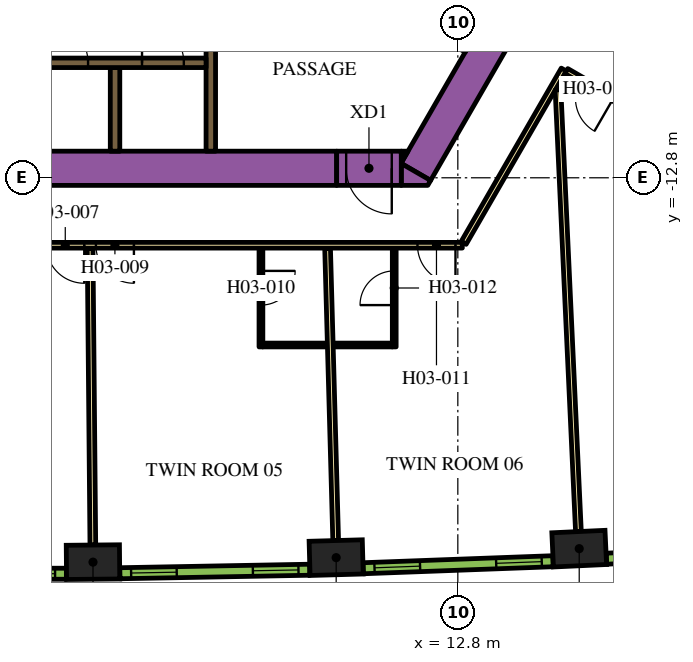
"""IFC4 building model, lengths in metres.
Left out: names, types, materials, properties, quantities, classifications, styles, units other than length and angle.
Written with IfcOpenShell. Run it as: python <this file> out.ifc"""

import sys

from ifc_helpers import new_model, si_unit, direction, frame, frame_2d, origin, origin_2d, place, context, subcontext, project, spatial, polyline, rectangle, outline, extrude, element, fill, save


model = new_model("IFC4")
c1 = context("Model", 3, precision=1e-05, world=origin(), true_north=direction((0.0, 1.0)))
c2 = subcontext(c1, "Body", "Model", "MODEL_VIEW")
j1 = project(units=[si_unit("LENGTHUNIT", "METRE"), si_unit("PLANEANGLEUNIT", "RADIAN")], contexts=[c1])
p1 = place(None, origin())
s1 = spatial("IfcSite", under=j1, at=p1, CompositionType="ELEMENT")
p2 = place(p1, origin())
s2 = spatial("IfcBuilding", under=s1, at=p2, CompositionType="ELEMENT")
p3 = place(p2, frame((0.0, 0.0, 58.8)))
s3 = spatial("IfcBuildingStorey", under=s2, at=p3, CompositionType="ELEMENT", Elevation=58.8)
for number, where, z_axis, x_axis in (
    (1, (3.2, -22.913, 0.0), (0.0, 0.0, 1.0), (1.0, 0.009, 0.0)),
    (2, (9.599, -22.795, 0.0), (0.0, 0.0, 1.0), (1.0, 0.028, 0.0)),
    (3, (15.994, -22.558, 0.0), (0.0, 0.0, 1.0), (0.999, 0.046, 0.0)),
):
    element("IfcColumn", number, at=place(p3, frame(where, z_axis=z_axis, x_axis=x_axis)), inside=s3, PredefinedType="COLUMN", context=c2, shape_type="SweptSolid", body=[
        extrude(rectangle(XDim=1.4, YDim=0.9, at=origin_2d()), origin(), (0.0, 0.0, 1.0), 3.9),
    ])
p4 = place(p3, frame((11.695, -12.644, 0.0), z_axis=(0.0, 0.0, 1.0), x_axis=(0.500010229568, 0.86601949766, 0.0)))
e4 = element("IfcWall", 4, at=p4, inside=s3, PredefinedType="SOLIDWALL", context=c2, shape_type="SweptSolid", body=[
    extrude(rectangle(XDim=9.326, YDim=0.9, at=frame_2d((4.663, 0.0))), origin(), (0.0, 0.0, 1.0), 3.9),
])
p5 = place(p3, origin())
e5 = element("IfcWall", 5, at=p5, inside=s3, PredefinedType="SOLIDWALL", context=c2, shape_type="SweptSolid", body=[
    extrude(outline(polyline([(12.009, -13.0), (11.312, -13.0), (11.312, -12.425), (12.083, -12.871), (12.009, -13.0)])), origin(), (0.0, 0.0, 1.0), 3.9),
])
e6 = element("IfcWall", 6, at=p5, inside=s3, PredefinedType="SOLIDWALL", context=c2, shape_type="SweptSolid", body=[
    extrude(outline(polyline([(11.489, -12.1), (11.312, -12.407), (11.312, -12.1), (11.489, -12.1)])), origin(), (0.0, 0.0, 1.0), 3.9),
])
p6 = place(p3, frame((-12.019, -12.55, 0.0), z_axis=(0.0, 0.0, 1.0), x_axis=(1.0, 0.0, 0.0)))
e7 = element("IfcWall", 7, at=p6, inside=s3, PredefinedType="SOLIDWALL", context=c2, shape_type="SweptSolid", body=[
    extrude(rectangle(XDim=21.63, YDim=0.9, at=frame_2d((10.815, 0.0))), origin(), (0.0, 0.0, 1.0), 3.9),
])
p7 = place(p3, frame((6.3, -8.67, 0.0), z_axis=(0.0, 0.0, 1.0), x_axis=(0.0, -1.0, 0.0)))
e8 = element("IfcWall", 8, at=p7, inside=s3, PredefinedType="SOLIDWALL", context=c2, shape_type="SweptSolid", body=[
    extrude(rectangle(XDim=3.43, YDim=0.25, at=frame_2d((1.715, 0.0))), origin(), (0.0, 0.0, 1.0), 3.9),
])
p8 = place(p3, frame((3.78, -12.1, 0.0), z_axis=(0.0, 0.0, 1.0), x_axis=(0.0, 1.0, 0.0)))
e9 = element("IfcWall", 9, at=p8, inside=s3, PredefinedType="SOLIDWALL", context=c2, shape_type="SweptSolid", body=[
    extrude(rectangle(XDim=2.2, YDim=0.25, at=frame_2d((1.1, 0.0))), origin(), (0.0, 0.0, 1.0), 3.9),
])
p9 = place(p3, frame((-6.175, -9.775, 0.0), z_axis=(0.0, 0.0, 1.0), x_axis=(1.0, 0.0, 0.0)))
e10 = element("IfcWall", 10, at=p9, inside=s3, PredefinedType="SOLIDWALL", context=c2, shape_type="SweptSolid", body=[
    extrude(rectangle(XDim=12.35, YDim=0.25, at=frame_2d((6.175, 0.0))), origin(), (0.0, 0.0, 1.0), 3.9),
])
p10 = place(p9, frame((0.585, 0.0, 0.0)))
e11 = element("IfcOpeningElement", 11, at=p10, cuts=e10, PredefinedType="OPENING", context=c2, shape_type="SweptSolid", body=[
    extrude(rectangle(XDim=1.1, YDim=2.1, at=frame_2d((0.55, 1.05))), frame((0.0, 0.135, 0.0), z_axis=(0.0, -1.0, 0.0), x_axis=(1.0, 0.0, 0.0)), (0.0, 0.0, 1.0), 0.27),
])
p11 = place(p9, frame((3.105, 0.0, 0.0)))
e12 = element("IfcOpeningElement", 12, at=p11, cuts=e10, PredefinedType="OPENING", context=c2, shape_type="SweptSolid", body=[
    extrude(rectangle(XDim=1.1, YDim=2.1, at=frame_2d((0.55, 1.05))), frame((0.0, 0.135, 0.0), z_axis=(0.0, -1.0, 0.0), x_axis=(1.0, 0.0, 0.0)), (0.0, 0.0, 1.0), 0.27),
])
p12 = place(p9, frame((5.625, 0.0, 0.0)))
e13 = element("IfcOpeningElement", 13, at=p12, cuts=e10, PredefinedType="OPENING", context=c2, shape_type="SweptSolid", body=[
    extrude(rectangle(XDim=1.1, YDim=2.1, at=frame_2d((0.55, 1.05))), frame((0.0, 0.135, 0.0), z_axis=(0.0, -1.0, 0.0), x_axis=(1.0, 0.0, 0.0)), (0.0, 0.0, 1.0), 0.27),
])
p13 = place(p9, frame((8.145, 0.0, 0.0)))
e14 = element("IfcOpeningElement", 14, at=p13, cuts=e10, PredefinedType="OPENING", context=c2, shape_type="SweptSolid", body=[
    extrude(rectangle(XDim=1.1, YDim=2.1, at=frame_2d((0.55, 1.05))), frame((0.0, 0.135, 0.0), z_axis=(0.0, -1.0, 0.0), x_axis=(1.0, 0.0, 0.0)), (0.0, 0.0, 1.0), 0.27),
])
p14 = place(p9, frame((10.665, 0.0, 0.0)))
e15 = element("IfcOpeningElement", 15, at=p14, cuts=e10, PredefinedType="OPENING", context=c2, shape_type="SweptSolid", body=[
    extrude(rectangle(XDim=1.1, YDim=2.1, at=frame_2d((0.55, 1.05))), frame((0.0, 0.135, 0.0), z_axis=(0.0, -1.0, 0.0), x_axis=(1.0, 0.0, 0.0)), (0.0, 0.0, 1.0), 0.27),
])
p15 = place(p3, frame((11.312, -12.55, 0.0), z_axis=(0.0, 0.0, 1.0), x_axis=(-1.0, 0.0, 0.0)))
e16 = element("IfcWall", 16, at=p15, inside=s3, PredefinedType="SOLIDWALL", context=c2, shape_type="SweptSolid", body=[
    extrude(rectangle(XDim=1.7, YDim=0.9, at=frame_2d((0.85, 0.0))), origin(), (0.0, 0.0, 1.0), 3.9),
])
p16 = place(p15, frame((0.25, 0.0, 0.0)))
e17 = element("IfcOpeningElement", 17, at=p16, cuts=e16, PredefinedType="OPENING", context=c2, shape_type="SweptSolid", body=[
    extrude(rectangle(XDim=1.2, YDim=2.1, at=frame_2d((0.6, 1.05))), frame((0.0, 0.46, 0.0), z_axis=(0.0, -1.0, 0.0), x_axis=(1.0, 0.0, 0.0)), (0.0, 0.0, 1.0), 0.92),
])
p17 = place(p3, frame((16.412, -8.523, 0.0), z_axis=(0.0, 0.0, 1.0), x_axis=(0.866022197818, -0.500005552856, 0.0)))
e18 = element("IfcWall", 18, at=p17, inside=s3, PredefinedType="PARTITIONING", context=c2, shape_type="SweptSolid", body=[
    extrude(rectangle(XDim=16.224, YDim=0.15, at=frame_2d((8.112, 0.0))), origin(), (0.0, 0.0, 1.0), 2.75),
])
p18 = place(p17, frame((7.949, 0.0, 0.0)))
e19 = element("IfcOpeningElement", 19, at=p18, cuts=e18, PredefinedType="OPENING", context=c2, shape_type="SweptSolid", body=[
    extrude(rectangle(XDim=1.0, YDim=2.1, at=frame_2d((0.5, 1.05))), frame((0.0, 0.085, 0.0), z_axis=(0.0, -1.0, 0.0), x_axis=(1.0, 0.0, 0.0)), (0.0, 0.0, 1.0), 0.17),
])
p19 = place(p17, frame((0.526, 0.0, 0.0)))
e20 = element("IfcOpeningElement", 20, at=p19, cuts=e18, PredefinedType="OPENING", context=c2, shape_type="SweptSolid", body=[
    extrude(rectangle(XDim=1.0, YDim=2.1, at=frame_2d((0.5, 1.05))), frame((0.0, 0.085, 0.0), z_axis=(0.0, -1.0, 0.0), x_axis=(1.0, 0.0, 0.0)), (0.0, 0.0, 1.0), 0.17),
])
p20 = place(p3, frame((12.918, -14.575, 0.0), z_axis=(0.0, 0.0, 1.0), x_axis=(-1.0, 0.0, 0.0)))
e21 = element("IfcWall", 21, at=p20, inside=s3, PredefinedType="PARTITIONING", context=c2, shape_type="SweptSolid", body=[
    extrude(rectangle(XDim=25.766, YDim=0.15, at=frame_2d((12.883, 0.0))), origin(), (0.0, 0.0, 1.0), 2.75),
])
p21 = place(p20, frame((24.586, 0.0, 0.0)))
e22 = element("IfcOpeningElement", 22, at=p21, cuts=e21, PredefinedType="OPENING", context=c2, shape_type="SweptSolid", body=[
    extrude(rectangle(XDim=1.0, YDim=2.1, at=frame_2d((0.5, 1.05))), frame((0.0, 0.085, 0.0), z_axis=(0.0, -1.0, 0.0), x_axis=(1.0, 0.0, 0.0)), (0.0, 0.0, 1.0), 0.17),
])
p22 = place(p20, frame((9.948, 0.0, 0.0)))
e23 = element("IfcOpeningElement", 23, at=p22, cuts=e21, PredefinedType="OPENING", context=c2, shape_type="SweptSolid", body=[
    extrude(rectangle(XDim=1.0, YDim=2.1, at=frame_2d((0.5, 1.05))), frame((0.0, 0.085, 0.0), z_axis=(0.0, -1.0, 0.0), x_axis=(1.0, 0.0, 0.0)), (0.0, 0.0, 1.0), 0.17),
])
p23 = place(p20, frame((8.642, 0.0, 0.0)))
e24 = element("IfcOpeningElement", 24, at=p23, cuts=e21, PredefinedType="OPENING", context=c2, shape_type="SweptSolid", body=[
    extrude(rectangle(XDim=1.0, YDim=2.1, at=frame_2d((0.5, 1.05))), frame((0.0, 0.085, 0.0), z_axis=(0.0, -1.0, 0.0), x_axis=(1.0, 0.0, 0.0)), (0.0, 0.0, 1.0), 0.17),
])
p24 = place(p20, frame((0.18, 0.0, 0.0)))
e25 = element("IfcOpeningElement", 25, at=p24, cuts=e21, PredefinedType="OPENING", context=c2, shape_type="SweptSolid", body=[
    extrude(rectangle(XDim=1.0, YDim=2.1, at=frame_2d((0.5, 1.05))), frame((0.0, 0.085, 0.0), z_axis=(0.0, -1.0, 0.0), x_axis=(1.0, 0.0, 0.0)), (0.0, 0.0, 1.0), 0.17),
])
p25 = place(p3, frame((15.587, -9.952, 0.0), z_axis=(0.0, 0.0, 1.0), x_axis=(-0.500016618951, -0.866015808616, 0.0)))
e26 = element("IfcWall", 26, at=p25, inside=s3, PredefinedType="PARTITIONING", context=c2, shape_type="SweptSolid", body=[
    extrude(rectangle(XDim=5.268, YDim=0.15, at=frame_2d((2.634, 0.0))), origin(), (0.0, 0.0, 1.0), 2.75),
])
p26 = place(p3, frame((29.638, -18.064, 0.0), z_axis=(0.0, 0.0, 1.0), x_axis=(-0.866026175601, 0.499998663172, 0.0)))
e27 = element("IfcWall", 27, at=p26, inside=s3, PredefinedType="PARTITIONING", context=c2, shape_type="SweptSolid", body=[
    extrude(rectangle(XDim=16.144, YDim=0.15, at=frame_2d((8.072, 0.0))), origin(), (0.0, 0.0, 1.0), 2.75),
])
p27 = place(p26, frame((14.714, 0.0, 0.0)))
e28 = element("IfcOpeningElement", 28, at=p27, cuts=e27, PredefinedType="OPENING", context=c2, shape_type="SweptSolid", body=[
    extrude(rectangle(XDim=1.0, YDim=2.1, at=frame_2d((0.5, 1.05))), frame((0.0, 0.085, 0.0), z_axis=(0.0, -1.0, 0.0), x_axis=(1.0, 0.0, 0.0)), (0.0, 0.0, 1.0), 0.17),
])
p28 = place(p26, frame((7.275, 0.0, 0.0)))
e29 = element("IfcOpeningElement", 29, at=p28, cuts=e27, PredefinedType="OPENING", context=c2, shape_type="SweptSolid", body=[
    extrude(rectangle(XDim=1.0, YDim=2.1, at=frame_2d((0.5, 1.05))), frame((0.0, 0.085, 0.0), z_axis=(0.0, -1.0, 0.0), x_axis=(1.0, 0.0, 0.0)), (0.0, 0.0, 1.0), 0.17),
])
p29 = place(p3, frame((3.196, -22.463, 0.0), z_axis=(0.0, 0.0, 1.0), x_axis=(-0.00926060032, 0.999957119721, 0.0)))
e30 = element("IfcWall", 30, at=p29, inside=s3, PredefinedType="PARTITIONING", context=c2, shape_type="SweptSolid", body=[
    extrude(rectangle(XDim=7.803, YDim=0.15, at=frame_2d((3.902, 0.0))), origin(), (0.0, 0.0, 1.0), 2.75),
])
p30 = place(p3, frame((9.586, -22.345, 0.0), z_axis=(0.0, 0.0, 1.0), x_axis=(-0.027722115646, 0.999615668297, 0.0)))
e31 = element("IfcWall", 31, at=p30, inside=s3, PredefinedType="PARTITIONING", context=c2, shape_type="SweptSolid", body=[
    extrude(rectangle(XDim=7.688, YDim=0.15, at=frame_2d((3.844, 0.0))), origin(), (0.0, 0.0, 1.0), 2.75),
])
p31 = place(p3, frame((15.973, -22.109, 0.0), z_axis=(0.0, 0.0, 1.0), x_axis=(-0.046191717129, 0.998932592955, 0.0)))
e32 = element("IfcWall", 32, at=p31, inside=s3, PredefinedType="PARTITIONING", context=c2, shape_type="SweptSolid", body=[
    extrude(rectangle(XDim=11.638, YDim=0.15, at=frame_2d((5.819, 0.0))), origin(), (0.0, 0.0, 1.0), 2.75),
])
p32 = place(p3, frame((7.619, -14.65, 0.0), z_axis=(0.0, 0.0, 1.0), x_axis=(0.0, -1.0, 0.0)))
e33 = element("IfcWall", 33, at=p32, inside=s3, PredefinedType="PARTITIONING", context=c2, shape_type="SweptSolid", body=[
    extrude(rectangle(XDim=2.6, YDim=0.1, at=frame_2d((1.3, 0.0))), origin(), (0.0, 0.0, 1.0), 2.75),
])
p33 = place(p32, frame((0.6, 0.0, 0.0)))
e34 = element("IfcOpeningElement", 34, at=p33, cuts=e33, PredefinedType="OPENING", context=c2, shape_type="SweptSolid", body=[
    extrude(rectangle(XDim=0.9, YDim=2.1, at=frame_2d((0.45, 1.05))), frame((0.0, 0.06, 0.0), z_axis=(0.0, -1.0, 0.0), x_axis=(1.0, 0.0, 0.0)), (0.0, 0.0, 1.0), 0.12),
])
p34 = place(p3, frame((7.669, -17.2, 0.0), z_axis=(0.0, 0.0, 1.0), x_axis=(1.0, 0.0, 0.0)))
e35 = element("IfcWall", 35, at=p34, inside=s3, PredefinedType="PARTITIONING", context=c2, shape_type="SweptSolid", body=[
    extrude(rectangle(XDim=1.69, YDim=0.1, at=frame_2d((0.845, 0.0))), origin(), (0.0, 0.0, 1.0), 2.75),
])
p35 = place(p3, frame((11.127, -17.25, 0.0), z_axis=(0.0, 0.0, 1.0), x_axis=(0.0, 1.0, 0.0)))
e36 = element("IfcWall", 36, at=p35, inside=s3, PredefinedType="PARTITIONING", context=c2, shape_type="SweptSolid", body=[
    extrude(rectangle(XDim=2.6, YDim=0.1, at=frame_2d((1.3, 0.0))), origin(), (0.0, 0.0, 1.0), 2.75),
])
p36 = place(p35, frame((1.1, 0.0, 0.0)))
e37 = element("IfcOpeningElement", 37, at=p36, cuts=e36, PredefinedType="OPENING", context=c2, shape_type="SweptSolid", body=[
    extrude(rectangle(XDim=0.9, YDim=2.1, at=frame_2d((0.45, 1.05))), frame((0.0, 0.06, 0.0), z_axis=(0.0, -1.0, 0.0), x_axis=(1.0, 0.0, 0.0)), (0.0, 0.0, 1.0), 0.12),
])
p37 = place(p3, frame((11.077, -17.2, 0.0), z_axis=(0.0, 0.0, 1.0), x_axis=(-1.0, 0.0, 0.0)))
e38 = element("IfcWall", 38, at=p37, inside=s3, PredefinedType="PARTITIONING", context=c2, shape_type="SweptSolid", body=[
    extrude(rectangle(XDim=1.55, YDim=0.1, at=frame_2d((0.775, 0.0))), origin(), (0.0, 0.0, 1.0), 2.75),
])
p38 = place(p3, frame((-2.499, -23.218, 0.0), z_axis=(0.0, 0.0, 1.0), x_axis=(1.0, 0.0, 0.0)))
e39 = element("IfcWall", 39, at=p38, inside=s3, PredefinedType="SOLIDWALL", context=c2, shape_type="SweptSolid", body=[
    extrude(rectangle(XDim=4.998, YDim=0.29, at=frame_2d((2.499, 0.0))), origin(), (0.0, 0.0, 1.0), 3.65),
])
p39 = place(p38, frame((0.297, 0.0, 0.9)))
e40 = element("IfcOpeningElement", 40, at=p39, cuts=e39, PredefinedType="OPENING", context=c2, shape_type="SweptSolid", body=[
    extrude(rectangle(XDim=1.2, YDim=2.15, at=frame_2d((0.6, 1.075))), frame((0.0, 0.155, 0.0), z_axis=(0.0, -1.0, 0.0), x_axis=(1.0, 0.0, 0.0)), (0.0, 0.0, 1.0), 0.31),
])
p40 = place(p38, frame((3.501, 0.0, 0.9)))
e41 = element("IfcOpeningElement", 41, at=p40, cuts=e39, PredefinedType="OPENING", context=c2, shape_type="SweptSolid", body=[
    extrude(rectangle(XDim=1.2, YDim=2.15, at=frame_2d((0.6, 1.075))), frame((0.0, 0.155, 0.0), z_axis=(0.0, -1.0, 0.0), x_axis=(1.0, 0.0, 0.0)), (0.0, 0.0, 1.0), 0.31),
])
p41 = place(p3, frame((3.906, -23.205, 0.0), z_axis=(0.0, 0.0, 1.0), x_axis=(0.999829529479, 0.018463801951, 0.0)))
e42 = element("IfcWall", 42, at=p41, inside=s3, PredefinedType="SOLIDWALL", context=c2, shape_type="SweptSolid", body=[
    extrude(rectangle(XDim=4.998, YDim=0.29, at=frame_2d((2.499, 0.0))), origin(), (0.0, 0.0, 1.0), 3.65),
])
p42 = place(p41, frame((0.297, 0.0, 0.9)))
e43 = element("IfcOpeningElement", 43, at=p42, cuts=e42, PredefinedType="OPENING", context=c2, shape_type="SweptSolid", body=[
    extrude(rectangle(XDim=1.2, YDim=2.15, at=frame_2d((0.6, 1.075))), frame((0.0, 0.155, 0.0), z_axis=(0.0, -1.0, 0.0), x_axis=(1.0, 0.0, 0.0)), (0.0, 0.0, 1.0), 0.31),
])
p43 = place(p41, frame((3.501, 0.0, 0.9)))
e44 = element("IfcOpeningElement", 44, at=p43, cuts=e42, PredefinedType="OPENING", context=c2, shape_type="SweptSolid", body=[
    extrude(rectangle(XDim=1.2, YDim=2.15, at=frame_2d((0.6, 1.075))), frame((0.0, 0.155, 0.0), z_axis=(0.0, -1.0, 0.0), x_axis=(1.0, 0.0, 0.0)), (0.0, 0.0, 1.0), 0.31),
])
p44 = place(p3, frame((10.31, -23.074, 0.0), z_axis=(0.0, 0.0, 1.0), x_axis=(0.999317974969, 0.036926750529, 0.0)))
e45 = element("IfcWall", 45, at=p44, inside=s3, PredefinedType="SOLIDWALL", context=c2, shape_type="SweptSolid", body=[
    extrude(rectangle(XDim=4.998, YDim=0.29, at=frame_2d((2.499, 0.0))), origin(), (0.0, 0.0, 1.0), 3.65),
])
p45 = place(p44, frame((0.297, 0.0, 0.9)))
e46 = element("IfcOpeningElement", 46, at=p45, cuts=e45, PredefinedType="OPENING", context=c2, shape_type="SweptSolid", body=[
    extrude(rectangle(XDim=1.2, YDim=2.15, at=frame_2d((0.6, 1.075))), frame((0.0, 0.155, 0.0), z_axis=(0.0, -1.0, 0.0), x_axis=(1.0, 0.0, 0.0)), (0.0, 0.0, 1.0), 0.31),
])
p46 = place(p44, frame((3.501, 0.0, 0.9)))
e47 = element("IfcOpeningElement", 47, at=p46, cuts=e45, PredefinedType="OPENING", context=c2, shape_type="SweptSolid", body=[
    extrude(rectangle(XDim=1.2, YDim=2.15, at=frame_2d((0.6, 1.075))), frame((0.0, 0.155, 0.0), z_axis=(0.0, -1.0, 0.0), x_axis=(1.0, 0.0, 0.0)), (0.0, 0.0, 1.0), 0.31),
])
p47 = place(p3, frame((16.711, -22.824, 0.0), z_axis=(0.0, 0.0, 1.0), x_axis=(0.998464708705, 0.055391564976, 0.0)))
e48 = element("IfcWall", 48, at=p47, inside=s3, PredefinedType="SOLIDWALL", context=c2, shape_type="SweptSolid", body=[
    extrude(rectangle(XDim=4.998, YDim=0.29, at=frame_2d((2.499, 0.0))), origin(), (0.0, 0.0, 1.0), 3.65),
])
p48 = place(p47, frame((0.297, 0.0, 0.9)))
e49 = element("IfcOpeningElement", 49, at=p48, cuts=e48, PredefinedType="OPENING", context=c2, shape_type="SweptSolid", body=[
    extrude(rectangle(XDim=1.2, YDim=2.15, at=frame_2d((0.6, 1.075))), frame((0.0, 0.155, 0.0), z_axis=(0.0, -1.0, 0.0), x_axis=(1.0, 0.0, 0.0)), (0.0, 0.0, 1.0), 0.31),
])
p49 = place(p47, frame((3.501, 0.0, 0.9)))
e50 = element("IfcOpeningElement", 50, at=p49, cuts=e48, PredefinedType="OPENING", context=c2, shape_type="SweptSolid", body=[
    extrude(rectangle(XDim=1.2, YDim=2.15, at=frame_2d((0.6, 1.075))), frame((0.0, 0.155, 0.0), z_axis=(0.0, -1.0, 0.0), x_axis=(1.0, 0.0, 0.0)), (0.0, 0.0, 1.0), 0.31),
])
p50 = place(p13, origin())
e51 = element("IfcDoor", 51, at=p50, inside=s3, OperationType="DOUBLE_DOOR_SLIDING", PredefinedType="DOOR", context=c2, shape_type="SweptSolid", body=[
    extrude(rectangle(XDim=1.1, YDim=2.1, at=frame_2d((0.55, 1.05))), frame((0.0, 0.025, 0.0), z_axis=(0.0, -1.0, 0.0), x_axis=(1.0, 0.0, 0.0)), (0.0, 0.0, 1.0), 0.05),
])
fill(e14, e51)
p51 = place(p14, origin())
e52 = element("IfcDoor", 52, at=p51, inside=s3, OperationType="DOUBLE_DOOR_SLIDING", PredefinedType="DOOR", context=c2, shape_type="SweptSolid", body=[
    extrude(rectangle(XDim=1.1, YDim=2.1, at=frame_2d((0.55, 1.05))), frame((0.0, 0.025, 0.0), z_axis=(0.0, -1.0, 0.0), x_axis=(1.0, 0.0, 0.0)), (0.0, 0.0, 1.0), 0.05),
])
fill(e15, e52)
p52 = place(p16, origin())
e53 = element("IfcDoor", 53, at=p52, inside=s3, OperationType="SINGLE_SWING_LEFT", PredefinedType="DOOR", context=c2, shape_type="SweptSolid", body=[
    extrude(rectangle(XDim=1.2, YDim=2.1, at=frame_2d((0.6, 1.05))), frame((0.0, 0.025, 0.0), z_axis=(0.0, -1.0, 0.0), x_axis=(1.0, 0.0, 0.0)), (0.0, 0.0, 1.0), 0.05),
])
fill(e17, e53)
p53 = place(p22, origin())
e54 = element("IfcDoor", 54, at=p53, inside=s3, OperationType="SINGLE_SWING_LEFT", PredefinedType="DOOR", context=c2, shape_type="SweptSolid", body=[
    extrude(rectangle(XDim=1.0, YDim=2.1, at=frame_2d((0.5, 1.05))), frame((0.0, 0.025, 0.0), z_axis=(0.0, -1.0, 0.0), x_axis=(1.0, 0.0, 0.0)), (0.0, 0.0, 1.0), 0.05),
])
fill(e23, e54)
p54 = place(p23, origin())
e55 = element("IfcDoor", 55, at=p54, inside=s3, OperationType="SINGLE_SWING_RIGHT", PredefinedType="DOOR", context=c2, shape_type="SweptSolid", body=[
    extrude(rectangle(XDim=1.0, YDim=2.1, at=frame_2d((0.5, 1.05))), frame((0.0, 0.025, 0.0), z_axis=(0.0, -1.0, 0.0), x_axis=(1.0, 0.0, 0.0)), (0.0, 0.0, 1.0), 0.05),
])
fill(e24, e55)
p55 = place(p33, origin())
e56 = element("IfcDoor", 56, at=p55, inside=s3, OperationType="SINGLE_SWING_LEFT", PredefinedType="DOOR", context=c2, shape_type="SweptSolid", body=[
    extrude(rectangle(XDim=0.9, YDim=2.1, at=frame_2d((0.45, 1.05))), frame((0.0, 0.025, 0.0), z_axis=(0.0, -1.0, 0.0), x_axis=(1.0, 0.0, 0.0)), (0.0, 0.0, 1.0), 0.05),
])
fill(e34, e56)
p56 = place(p24, origin())
e57 = element("IfcDoor", 57, at=p56, inside=s3, OperationType="SINGLE_SWING_LEFT", PredefinedType="DOOR", context=c2, shape_type="SweptSolid", body=[
    extrude(rectangle(XDim=1.0, YDim=2.1, at=frame_2d((0.5, 1.05))), frame((0.0, 0.025, 0.0), z_axis=(0.0, -1.0, 0.0), x_axis=(1.0, 0.0, 0.0)), (0.0, 0.0, 1.0), 0.05),
])
fill(e25, e57)
p57 = place(p36, origin())
e58 = element("IfcDoor", 58, at=p57, inside=s3, OperationType="SINGLE_SWING_RIGHT", PredefinedType="DOOR", context=c2, shape_type="SweptSolid", body=[
    extrude(rectangle(XDim=0.9, YDim=2.1, at=frame_2d((0.45, 1.05))), frame((0.0, 0.025, 0.0), z_axis=(0.0, -1.0, 0.0), x_axis=(1.0, 0.0, 0.0)), (0.0, 0.0, 1.0), 0.05),
])
fill(e37, e58)
p58 = place(p27, origin())
e59 = element("IfcDoor", 59, at=p58, inside=s3, OperationType="SINGLE_SWING_RIGHT", PredefinedType="DOOR", context=c2, shape_type="SweptSolid", body=[
    extrude(rectangle(XDim=1.0, YDim=2.1, at=frame_2d((0.5, 1.05))), frame((0.0, 0.025, 0.0), z_axis=(0.0, -1.0, 0.0), x_axis=(1.0, 0.0, 0.0)), (0.0, 0.0, 1.0), 0.05),
])
fill(e28, e59)
p59 = place(p40, origin())
e60 = element("IfcWindow", 60, at=p59, inside=s3, PartitioningType="DOUBLE_PANEL_VERTICAL", PredefinedType="WINDOW", context=c2, shape_type="SweptSolid", body=[
    extrude(rectangle(XDim=1.2, YDim=2.15, at=frame_2d((0.6, 1.075))), frame((0.0, 0.015, 0.0), z_axis=(0.0, -1.0, 0.0), x_axis=(1.0, 0.0, 0.0)), (0.0, 0.0, 1.0), 0.06),
])
fill(e41, e60)
p60 = place(p42, origin())
e61 = element("IfcWindow", 61, at=p60, inside=s3, PartitioningType="DOUBLE_PANEL_VERTICAL", PredefinedType="WINDOW", context=c2, shape_type="SweptSolid", body=[
    extrude(rectangle(XDim=1.2, YDim=2.15, at=frame_2d((0.6, 1.075))), frame((0.0, 0.015, 0.0), z_axis=(0.0, -1.0, 0.0), x_axis=(1.0, 0.0, 0.0)), (0.0, 0.0, 1.0), 0.06),
])
fill(e43, e61)
p61 = place(p43, origin())
e62 = element("IfcWindow", 62, at=p61, inside=s3, PartitioningType="DOUBLE_PANEL_VERTICAL", PredefinedType="WINDOW", context=c2, shape_type="SweptSolid", body=[
    extrude(rectangle(XDim=1.2, YDim=2.15, at=frame_2d((0.6, 1.075))), frame((0.0, 0.015, 0.0), z_axis=(0.0, -1.0, 0.0), x_axis=(1.0, 0.0, 0.0)), (0.0, 0.0, 1.0), 0.06),
])
fill(e44, e62)
p62 = place(p45, origin())
e63 = element("IfcWindow", 63, at=p62, inside=s3, PartitioningType="DOUBLE_PANEL_VERTICAL", PredefinedType="WINDOW", context=c2, shape_type="SweptSolid", body=[
    extrude(rectangle(XDim=1.2, YDim=2.15, at=frame_2d((0.6, 1.075))), frame((0.0, 0.015, 0.0), z_axis=(0.0, -1.0, 0.0), x_axis=(1.0, 0.0, 0.0)), (0.0, 0.0, 1.0), 0.06),
])
fill(e46, e63)
p63 = place(p46, origin())
e64 = element("IfcWindow", 64, at=p63, inside=s3, PartitioningType="DOUBLE_PANEL_VERTICAL", PredefinedType="WINDOW", context=c2, shape_type="SweptSolid", body=[
    extrude(rectangle(XDim=1.2, YDim=2.15, at=frame_2d((0.6, 1.075))), frame((0.0, 0.015, 0.0), z_axis=(0.0, -1.0, 0.0), x_axis=(1.0, 0.0, 0.0)), (0.0, 0.0, 1.0), 0.06),
])
fill(e47, e64)
save(model, sys.argv[1])
